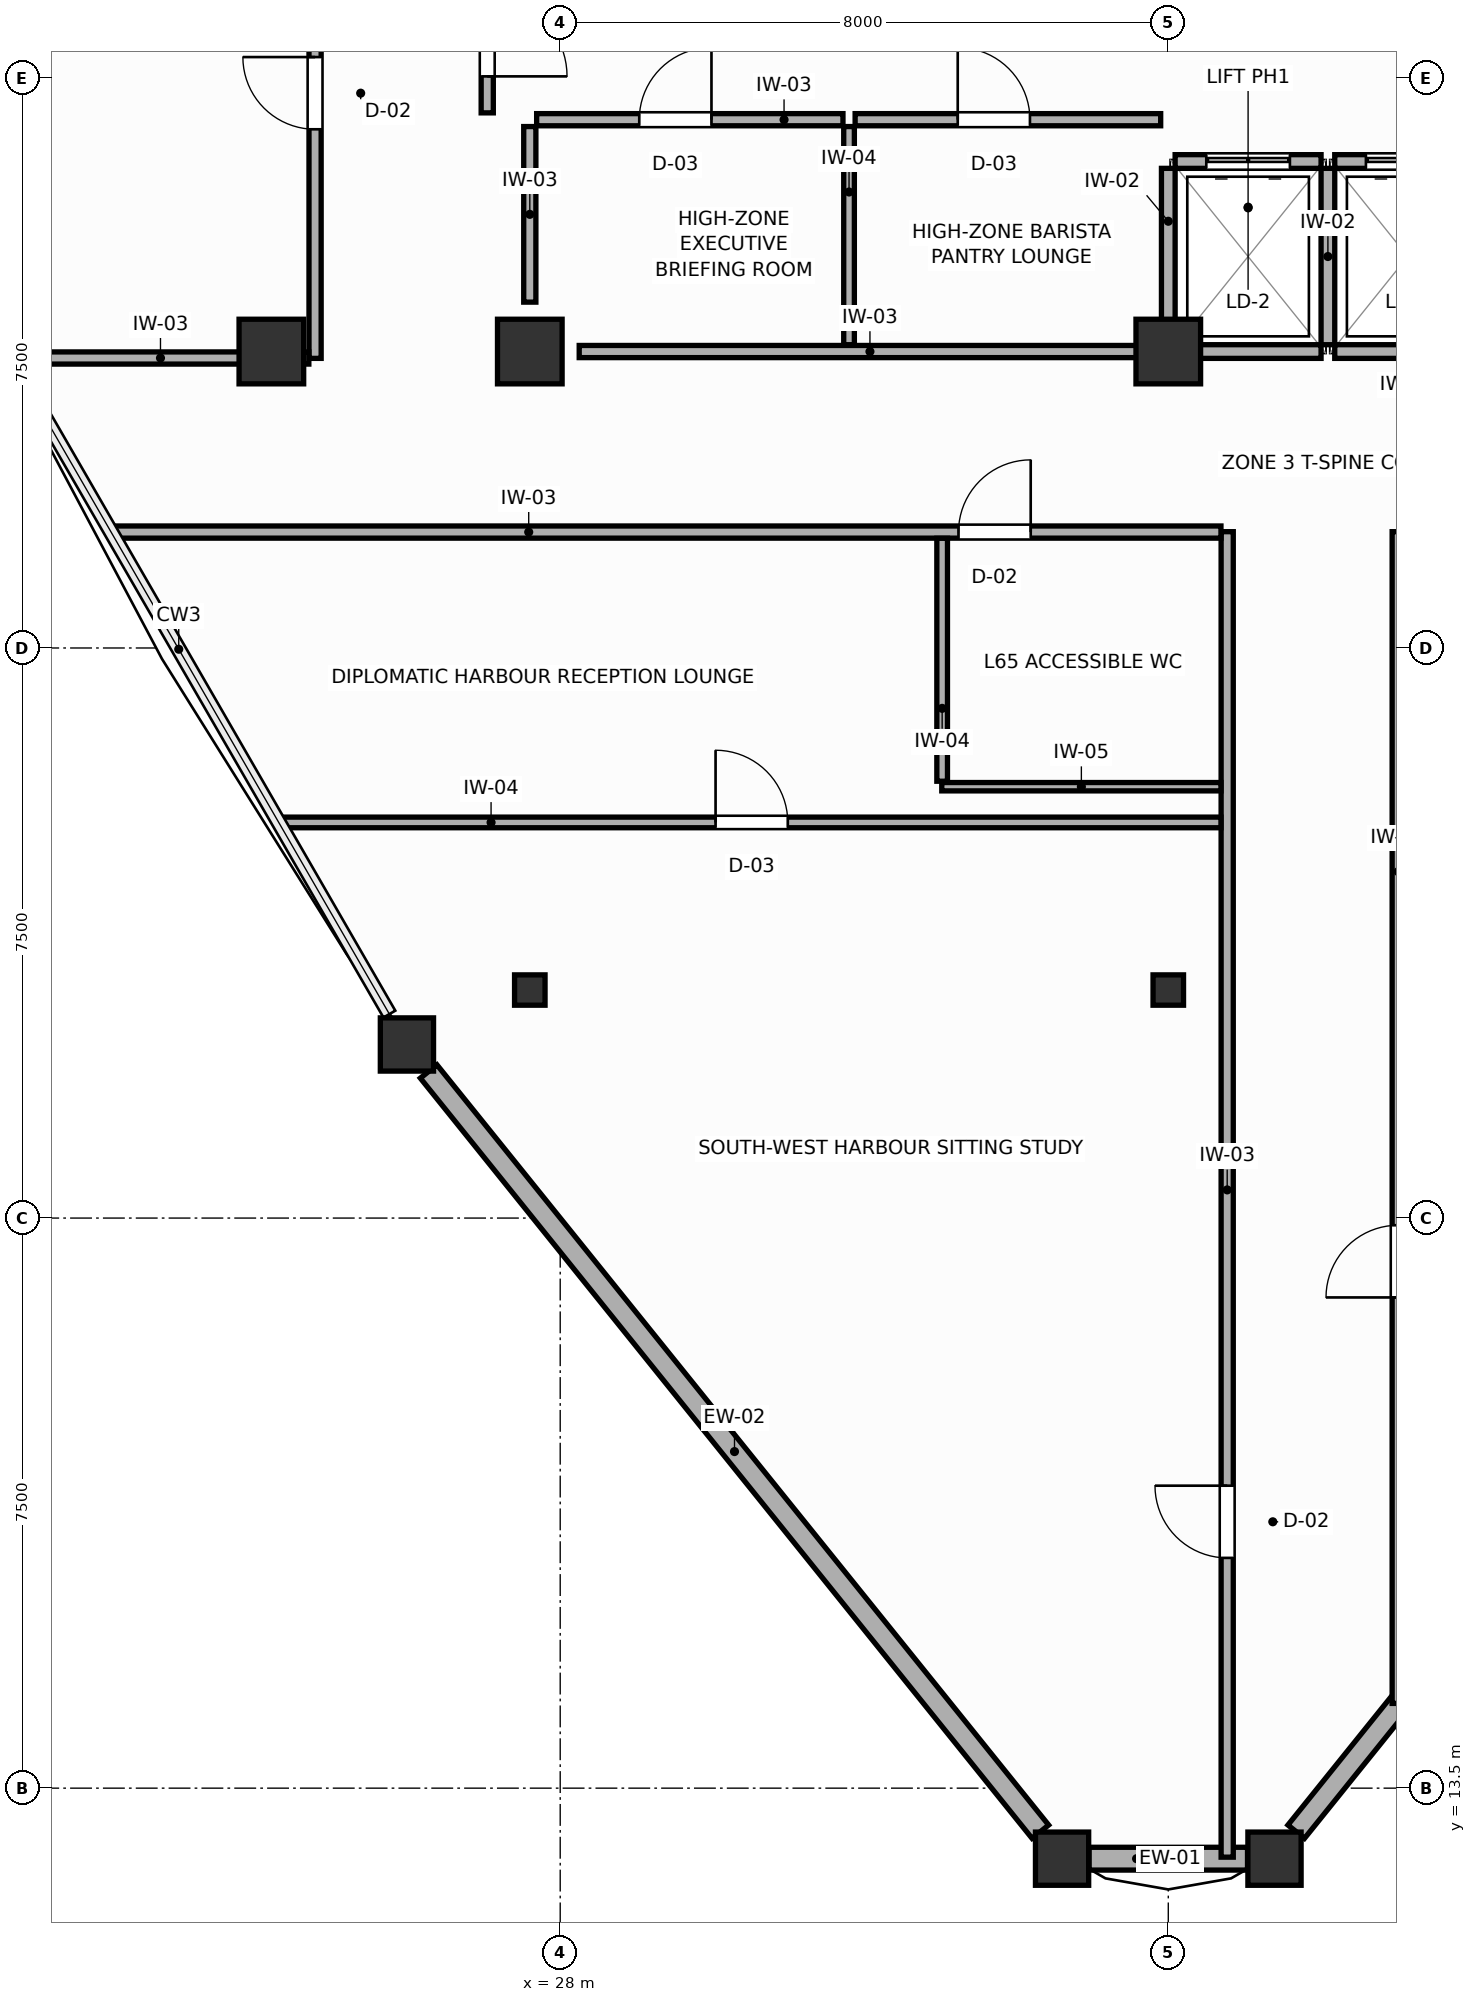
"""IFC4 building model, lengths in metres.
Left out: names, types, materials, properties, quantities, classifications, styles, units other than length and angle.
Written with IfcOpenShell. Run it as: python <this file> out.ifc"""

import sys

from ifc_helpers import new_model, si_unit, direction, frame, frame_2d, origin, origin_2d, place, context, subcontext, project, spatial, rectangle, i_section, extrude, source, transform, mapped, element, fill, save


model = new_model("IFC4")
c1 = context("Model", 3, precision=1e-05, world=origin(), true_north=direction((0.0, 1.0)))
c2 = subcontext(c1, "Body", "Model", "MODEL_VIEW")
j1 = project(units=[si_unit("LENGTHUNIT", "METRE"), si_unit("PLANEANGLEUNIT", "RADIAN")], contexts=[c1])
p1 = place(None, origin())
s1 = spatial("IfcSite", under=j1, at=p1, CompositionType="ELEMENT")
p2 = place(p1, origin())
s2 = spatial("IfcBuilding", under=s1, at=p2, CompositionType="ELEMENT")
p3 = place(p2, frame((0.0, 0.0, 250.2)))
s3 = spatial("IfcBuildingStorey", under=s2, at=p3, CompositionType="ELEMENT", Elevation=250.2)
m1 = source(origin(), c2, "Body", "SweptSolid", [
    extrude(rectangle(XDim=0.85, YDim=0.85, at=origin_2d()), origin(), (0.0, 0.0, 1.0), 3.6),
])
for number, where, z_axis, x_axis in (
    (1, (27.6, 32.4, 0.0), (0.0, 0.0, 1.0), (1.0, 0.0, 0.0)),
    (2, (36.0, 32.4, 0.0), (0.0, 0.0, 1.0), (1.0, 0.0, 0.0)),
    (3, (24.2, 32.4, 0.0), (0.0, 0.0, 1.0), (1.0, 0.0, 0.0)),
):
    element("IfcColumn", number, at=place(p3, frame(where, z_axis=z_axis, x_axis=x_axis)), inside=s3, PredefinedType="COLUMN", context=c2, shape_type="MappedRepresentation", body=[
        mapped(m1, transform((0.0, 0.0, 0.0), scale=1.0)),
    ])
m2 = source(origin(), c2, "Body", "SweptSolid", [
    extrude(i_section(OverallWidth=0.401, OverallDepth=0.399, WebThickness=0.022, FlangeThickness=0.036, FilletRadius=0.015, at=origin_2d()), origin(), (0.0, 0.0, 1.0), 3.6),
])
for number, where, z_axis, x_axis in (
    (4, (27.6, 24.0, 0.0), (0.0, 0.0, 1.0), (1.0, 0.0, 0.0)),
    (5, (36.0, 24.0, 0.0), (0.0, 0.0, 1.0), (1.0, 0.0, 0.0)),
):
    element("IfcColumn", number, at=place(p3, frame(where, z_axis=z_axis, x_axis=x_axis)), inside=s3, PredefinedType="COLUMN", context=c2, shape_type="MappedRepresentation", body=[
        mapped(m2, transform((0.0, 0.0, 0.0), scale=1.0)),
    ])
m3 = source(origin(), c2, "Body", "SweptSolid", [
    extrude(rectangle(XDim=0.7, YDim=0.7, at=origin_2d()), origin(), (0.0, 0.0, 1.0), 3.6),
])
for number, where, z_axis, x_axis in (
    (6, (25.983, 23.284, 0.0), (0.0, 0.0, 1.0), (1.0, 0.0, 0.0)),
    (7, (34.603, 12.572, 0.0), (0.0, 0.0, 1.0), (1.0, 0.0, 0.0)),
    (8, (37.397, 12.572, 0.0), (0.0, 0.0, 1.0), (1.0, 0.0, 0.0)),
):
    element("IfcColumn", number, at=place(p3, frame(where, z_axis=z_axis, x_axis=x_axis)), inside=s3, PredefinedType="COLUMN", context=c2, shape_type="MappedRepresentation", body=[
        mapped(m3, transform((0.0, 0.0, 0.0), scale=1.0)),
    ])
p4 = place(p3, frame((26.269, 22.929, 0.0), z_axis=(0.0, 0.0, 1.0), x_axis=(0.626898207352, -0.779101172903, 0.0)))
e9 = element("IfcWall", 9, at=p4, inside=s3, PredefinedType="SOLIDWALL", context=c2, shape_type="SweptSolid", body=[
    extrude(rectangle(XDim=12.837, YDim=0.28, at=frame_2d((6.418, 0.0))), origin(), (0.0, 0.0, 1.0), 1.88),
])
p5 = place(p3, frame((34.958, 12.572, 0.0), z_axis=(0.0, 0.0, 1.0), x_axis=(1.0, 0.0, 0.0)))
e10 = element("IfcWall", 10, at=p5, inside=s3, PredefinedType="SOLIDWALL", context=c2, shape_type="SweptSolid", body=[
    extrude(rectangle(XDim=2.085, YDim=0.3, at=frame_2d((1.042, 0.0))), origin(), (0.0, 0.0, 1.0), 1.88),
])
p6 = place(p3, frame((37.683, 12.927, 0.0), z_axis=(0.0, 0.0, 1.0), x_axis=(0.626898207352, 0.779101172903, 0.0)))
e11 = element("IfcWall", 11, at=p6, inside=s3, PredefinedType="SOLIDWALL", context=c2, shape_type="SweptSolid", body=[
    extrude(rectangle(XDim=12.837, YDim=0.28, at=frame_2d((6.418, 0.0))), origin(), (0.0, 0.0, 1.0), 1.88),
])
p7 = place(p3, frame((36.09, 34.9, 0.0), z_axis=(0.0, 0.0, 1.0), x_axis=(1.0, 0.0, 0.0)))
e12 = element("IfcWall", 12, at=p7, inside=s3, PredefinedType="PARTITIONING", context=c2, shape_type="SweptSolid", body=[
    extrude(rectangle(XDim=1.92, YDim=0.18, at=frame_2d((0.96, 0.0))), origin(), (0.0, 0.0, 1.0), 3.41),
])
p8 = place(p7, frame((0.41, 0.0, 0.0)))
e13 = element("IfcOpeningElement", 13, at=p8, cuts=e12, PredefinedType="OPENING", context=c2, shape_type="SweptSolid", body=[
    extrude(rectangle(XDim=1.1, YDim=2.1, at=frame_2d((0.55, 1.05))), frame((0.0, 0.1, 0.0), z_axis=(0.0, -1.0, 0.0), x_axis=(1.0, 0.0, 0.0)), (0.0, 0.0, 1.0), 0.2),
])
p9 = place(p3, frame((36.09, 32.4, 0.0), z_axis=(0.0, 0.0, 1.0), x_axis=(1.0, 0.0, 0.0)))
e14 = element("IfcWall", 14, at=p9, inside=s3, PredefinedType="PARTITIONING", context=c2, shape_type="SweptSolid", body=[
    extrude(rectangle(XDim=1.92, YDim=0.18, at=frame_2d((0.96, 0.0))), origin(), (0.0, 0.0, 1.0), 2.17),
])
p10 = place(p3, frame((36.0, 32.49, 0.0), z_axis=(0.0, 0.0, 1.0), x_axis=(0.0, 1.0, 0.0)))
e15 = element("IfcWall", 15, at=p10, inside=s3, PredefinedType="PARTITIONING", context=c2, shape_type="SweptSolid", body=[
    extrude(rectangle(XDim=2.32, YDim=0.18, at=frame_2d((1.16, 0.0))), origin(), (0.0, 0.0, 1.0), 3.41),
])
p11 = place(p3, frame((38.19, 34.9, 0.0), z_axis=(0.0, 0.0, 1.0), x_axis=(1.0, 0.0, 0.0)))
e16 = element("IfcWall", 16, at=p11, inside=s3, PredefinedType="PARTITIONING", context=c2, shape_type="SweptSolid", body=[
    extrude(rectangle(XDim=1.92, YDim=0.18, at=frame_2d((0.96, 0.0))), origin(), (0.0, 0.0, 1.0), 3.41),
])
p12 = place(p11, frame((0.41, 0.0, 0.0)))
e17 = element("IfcOpeningElement", 17, at=p12, cuts=e16, PredefinedType="OPENING", context=c2, shape_type="SweptSolid", body=[
    extrude(rectangle(XDim=1.1, YDim=2.1, at=frame_2d((0.55, 1.05))), frame((0.0, 0.1, 0.0), z_axis=(0.0, -1.0, 0.0), x_axis=(1.0, 0.0, 0.0)), (0.0, 0.0, 1.0), 0.2),
])
p13 = place(p3, frame((38.19, 32.4, 0.0), z_axis=(0.0, 0.0, 1.0), x_axis=(1.0, 0.0, 0.0)))
e18 = element("IfcWall", 18, at=p13, inside=s3, PredefinedType="PARTITIONING", context=c2, shape_type="SweptSolid", body=[
    extrude(rectangle(XDim=1.92, YDim=0.18, at=frame_2d((0.96, 0.0))), origin(), (0.0, 0.0, 1.0), 2.17),
])
p14 = place(p3, frame((38.1, 32.49, 0.0), z_axis=(0.0, 0.0, 1.0), x_axis=(0.0, 1.0, 0.0)))
e19 = element("IfcWall", 19, at=p14, inside=s3, PredefinedType="PARTITIONING", context=c2, shape_type="SweptSolid", body=[
    extrude(rectangle(XDim=2.32, YDim=0.18, at=frame_2d((1.16, 0.0))), origin(), (0.0, 0.0, 1.0), 3.41),
])
p15 = place(p3, frame((28.25, 32.4, 0.0), z_axis=(0.0, 0.0, 1.0), x_axis=(1.0, 0.0, 0.0)))
e20 = element("IfcWall", 20, at=p15, inside=s3, PredefinedType="PARTITIONING", context=c2, shape_type="SweptSolid", body=[
    extrude(rectangle(XDim=7.65, YDim=0.16, at=frame_2d((3.825, 0.0))), origin(), (0.0, 0.0, 1.0), 2.17),
])
p16 = place(p3, frame((27.6, 33.05, 0.0), z_axis=(0.0, 0.0, 1.0), x_axis=(0.0, 1.0, 0.0)))
e21 = element("IfcWall", 21, at=p16, inside=s3, PredefinedType="PARTITIONING", context=c2, shape_type="SweptSolid", body=[
    extrude(rectangle(XDim=2.31, YDim=0.16, at=frame_2d((1.155, 0.0))), origin(), (0.0, 0.0, 1.0), 3.41),
])
p17 = place(p3, frame((31.8, 32.49, 0.0), z_axis=(0.0, 0.0, 1.0), x_axis=(0.0, 1.0, 0.0)))
e22 = element("IfcWall", 22, at=p17, inside=s3, PredefinedType="PARTITIONING", context=c2, shape_type="SweptSolid", body=[
    extrude(rectangle(XDim=2.87, YDim=0.14, at=frame_2d((1.435, 0.0))), origin(), (0.0, 0.0, 1.0), 3.41),
])
p18 = place(p3, frame((27.69, 35.45, 0.0), z_axis=(0.0, 0.0, 1.0), x_axis=(1.0, 0.0, 0.0)))
e23 = element("IfcWall", 23, at=p18, inside=s3, PredefinedType="PARTITIONING", context=c2, shape_type="SweptSolid", body=[
    extrude(rectangle(XDim=4.03, YDim=0.16, at=frame_2d((2.015, 0.0))), origin(), (0.0, 0.0, 1.0), 3.41),
])
p19 = place(p18, frame((1.35, 0.0, 0.0)))
e24 = element("IfcOpeningElement", 24, at=p19, cuts=e23, PredefinedType="OPENING", context=c2, shape_type="SweptSolid", body=[
    extrude(rectangle(XDim=0.95, YDim=2.05, at=frame_2d((0.475, 1.025))), frame((0.0, 0.09, 0.0), z_axis=(0.0, -1.0, 0.0), x_axis=(1.0, 0.0, 0.0)), (0.0, 0.0, 1.0), 0.18),
])
p20 = place(p3, frame((31.88, 35.45, 0.0), z_axis=(0.0, 0.0, 1.0), x_axis=(1.0, 0.0, 0.0)))
e25 = element("IfcWall", 25, at=p20, inside=s3, PredefinedType="PARTITIONING", context=c2, shape_type="SweptSolid", body=[
    extrude(rectangle(XDim=4.02, YDim=0.16, at=frame_2d((2.01, 0.0))), origin(), (0.0, 0.0, 1.0), 3.41),
])
p21 = place(p20, frame((1.35, 0.0, 0.0)))
e26 = element("IfcOpeningElement", 26, at=p21, cuts=e25, PredefinedType="OPENING", context=c2, shape_type="SweptSolid", body=[
    extrude(rectangle(XDim=0.95, YDim=2.05, at=frame_2d((0.475, 1.025))), frame((0.0, 0.09, 0.0), z_axis=(0.0, -1.0, 0.0), x_axis=(1.0, 0.0, 0.0)), (0.0, 0.0, 1.0), 0.18),
])
p22 = place(p3, frame((27.04, 35.54, 0.0), z_axis=(0.0, 0.0, 1.0), x_axis=(0.0, 1.0, 0.0)))
e27 = element("IfcWall", 27, at=p22, inside=s3, PredefinedType="PARTITIONING", context=c2, shape_type="SweptSolid", body=[
    extrude(rectangle(XDim=2.11, YDim=0.16, at=frame_2d((1.055, 0.0))), origin(), (0.0, 0.0, 1.0), 3.41),
])
p23 = place(p22, frame((0.48, 0.0, 0.0)))
e28 = element("IfcOpeningElement", 28, at=p23, cuts=e27, PredefinedType="OPENING", context=c2, shape_type="SweptSolid", body=[
    extrude(rectangle(XDim=1.05, YDim=2.1, at=frame_2d((0.525, 1.05))), frame((0.0, 0.09, 0.0), z_axis=(0.0, -1.0, 0.0), x_axis=(1.0, 0.0, 0.0)), (0.0, 0.0, 1.0), 0.18),
])
p24 = place(p3, frame((24.775, 32.31, 0.0), z_axis=(0.0, 0.0, 1.0), x_axis=(0.0, 1.0, 0.0)))
e29 = element("IfcWall", 29, at=p24, inside=s3, PredefinedType="PARTITIONING", context=c2, shape_type="SweptSolid", body=[
    extrude(rectangle(XDim=17.892, YDim=0.16, at=frame_2d((8.946, 0.0))), origin(), (0.0, 0.0, 1.0), 3.41),
])
p25 = place(p24, frame((3.014, 0.0, 0.0)))
e30 = element("IfcOpeningElement", 30, at=p25, cuts=e29, PredefinedType="OPENING", context=c2, shape_type="SweptSolid", body=[
    extrude(rectangle(XDim=0.95, YDim=2.05, at=frame_2d((0.475, 1.025))), frame((0.0, 0.09, 0.0), z_axis=(0.0, -1.0, 0.0), x_axis=(1.0, 0.0, 0.0)), (0.0, 0.0, 1.0), 0.18),
])
p26 = place(p24, frame((11.524, 0.0, 0.0)))
e31 = element("IfcOpeningElement", 31, at=p26, cuts=e29, PredefinedType="OPENING", context=c2, shape_type="SweptSolid", body=[
    extrude(rectangle(XDim=0.95, YDim=2.05, at=frame_2d((0.475, 1.025))), frame((0.0, 0.09, 0.0), z_axis=(0.0, -1.0, 0.0), x_axis=(1.0, 0.0, 0.0)), (0.0, 0.0, 1.0), 0.18),
])
p27 = place(p3, frame((36.775, 12.592, 0.0), z_axis=(0.0, 0.0, 1.0), x_axis=(0.0, 1.0, 0.0)))
e32 = element("IfcWall", 32, at=p27, inside=s3, PredefinedType="PARTITIONING", context=c2, shape_type="SweptSolid", body=[
    extrude(rectangle(XDim=17.438, YDim=0.16, at=frame_2d((8.719, 0.0))), origin(), (0.0, 0.0, 1.0), 3.41),
])
p28 = place(p27, frame((3.937, 0.0, 0.0)))
e33 = element("IfcOpeningElement", 33, at=p28, cuts=e32, PredefinedType="OPENING", context=c2, shape_type="SweptSolid", body=[
    extrude(rectangle(XDim=0.95, YDim=2.05, at=frame_2d((0.475, 1.025))), frame((0.0, 0.09, 0.0), z_axis=(0.0, -1.0, 0.0), x_axis=(1.0, 0.0, 0.0)), (0.0, 0.0, 1.0), 0.18),
])
p29 = place(p3, frame((39.025, 14.615, 0.0), z_axis=(0.0, 0.0, 1.0), x_axis=(0.0, 1.0, 0.0)))
e34 = element("IfcWall", 34, at=p29, inside=s3, PredefinedType="PARTITIONING", context=c2, shape_type="SweptSolid", body=[
    extrude(rectangle(XDim=15.415, YDim=0.16, at=frame_2d((7.708, 0.0))), origin(), (0.0, 0.0, 1.0), 3.41),
])
p30 = place(p29, frame((5.341, 0.0, 0.0)))
e35 = element("IfcOpeningElement", 35, at=p30, cuts=e34, PredefinedType="OPENING", context=c2, shape_type="SweptSolid", body=[
    extrude(rectangle(XDim=0.95, YDim=2.05, at=frame_2d((0.475, 1.025))), frame((0.0, 0.09, 0.0), z_axis=(0.0, -1.0, 0.0), x_axis=(1.0, 0.0, 0.0)), (0.0, 0.0, 1.0), 0.18),
])
p31 = place(p3, frame((22.111, 30.025, 0.0), z_axis=(0.0, 0.0, 1.0), x_axis=(1.0, 0.0, 0.0)))
e36 = element("IfcWall", 36, at=p31, inside=s3, PredefinedType="PARTITIONING", context=c2, shape_type="SweptSolid", body=[
    extrude(rectangle(XDim=14.582, YDim=0.16, at=frame_2d((7.291, 0.0))), origin(), (0.0, 0.0, 1.0), 3.41),
])
p32 = place(p31, frame((11.129, 0.0, 0.0)))
e37 = element("IfcOpeningElement", 37, at=p32, cuts=e36, PredefinedType="OPENING", context=c2, shape_type="SweptSolid", body=[
    extrude(rectangle(XDim=0.95, YDim=2.05, at=frame_2d((0.475, 1.025))), frame((0.0, 0.09, 0.0), z_axis=(0.0, -1.0, 0.0), x_axis=(1.0, 0.0, 0.0)), (0.0, 0.0, 1.0), 0.18),
])
p33 = place(p3, frame((20.789, 32.315, 0.0), z_axis=(0.0, 0.0, 1.0), x_axis=(1.0, 0.0, 0.0)))
e38 = element("IfcWall", 38, at=p33, inside=s3, PredefinedType="PARTITIONING", context=c2, shape_type="SweptSolid", body=[
    extrude(rectangle(XDim=3.904, YDim=0.16, at=frame_2d((1.952, 0.0))), origin(), (0.0, 0.0, 1.0), 2.17),
])
p34 = place(p3, frame((24.317, 26.205, 0.0), z_axis=(0.0, 0.0, 1.0), x_axis=(1.0, 0.0, 0.0)))
e39 = element("IfcWall", 39, at=p34, inside=s3, PredefinedType="PARTITIONING", context=c2, shape_type="SweptSolid", body=[
    extrude(rectangle(XDim=12.376, YDim=0.14, at=frame_2d((6.188, 0.0))), origin(), (0.0, 0.0, 1.0), 3.41),
])
p35 = place(p34, frame((5.727, 0.0, 0.0)))
e40 = element("IfcOpeningElement", 40, at=p35, cuts=e39, PredefinedType="OPENING", context=c2, shape_type="SweptSolid", body=[
    extrude(rectangle(XDim=0.95, YDim=2.05, at=frame_2d((0.475, 1.025))), frame((0.0, 0.08, 0.0), z_axis=(0.0, -1.0, 0.0), x_axis=(1.0, 0.0, 0.0)), (0.0, 0.0, 1.0), 0.16),
])
p36 = place(p3, frame((33.02, 26.675, 0.0), z_axis=(0.0, 0.0, 1.0), x_axis=(1.0, 0.0, 0.0)))
e41 = element("IfcWall", 41, at=p36, inside=s3, PredefinedType="MOVABLE", context=c2, shape_type="SweptSolid", body=[
    extrude(rectangle(XDim=3.673, YDim=0.11, at=frame_2d((1.836, 0.0))), origin(), (0.0, 0.0, 1.0), 3.41),
])
p37 = place(p3, frame((33.025, 26.747, 0.0), z_axis=(0.0, 0.0, 1.0), x_axis=(0.0, 1.0, 0.0)))
e42 = element("IfcWall", 42, at=p37, inside=s3, PredefinedType="PARTITIONING", context=c2, shape_type="SweptSolid", body=[
    extrude(rectangle(XDim=3.196, YDim=0.14, at=frame_2d((1.598, 0.0))), origin(), (0.0, 0.0, 1.0), 3.41),
])
p38 = place(p8, origin())
e43 = element("IfcDoor", 43, at=p38, inside=s3, OperationType="DOUBLE_DOOR_SLIDING", PredefinedType="DOOR", context=c2, shape_type="SweptSolid", body=[
    extrude(rectangle(XDim=1.1, YDim=2.1, at=frame_2d((0.55, 1.05))), frame((0.0, 0.025, 0.0), z_axis=(0.0, -1.0, 0.0), x_axis=(1.0, 0.0, 0.0)), (0.0, 0.0, 1.0), 0.05),
])
fill(e13, e43)
p39 = place(p12, origin())
e44 = element("IfcDoor", 44, at=p39, inside=s3, OperationType="DOUBLE_DOOR_SLIDING", PredefinedType="DOOR", context=c2, shape_type="SweptSolid", body=[
    extrude(rectangle(XDim=1.1, YDim=2.1, at=frame_2d((0.55, 1.05))), frame((0.0, 0.025, 0.0), z_axis=(0.0, -1.0, 0.0), x_axis=(1.0, 0.0, 0.0)), (0.0, 0.0, 1.0), 0.05),
])
fill(e17, e44)
p40 = place(p19, origin())
e45 = element("IfcDoor", 45, at=p40, inside=s3, OperationType="SINGLE_SWING_RIGHT", PredefinedType="DOOR", context=c2, shape_type="SweptSolid", body=[
    extrude(rectangle(XDim=0.95, YDim=2.05, at=frame_2d((0.475, 1.025))), frame((0.0, 0.025, 0.0), z_axis=(0.0, -1.0, 0.0), x_axis=(1.0, 0.0, 0.0)), (0.0, 0.0, 1.0), 0.05),
])
fill(e24, e45)
p41 = place(p21, origin())
e46 = element("IfcDoor", 46, at=p41, inside=s3, OperationType="SINGLE_SWING_LEFT", PredefinedType="DOOR", context=c2, shape_type="SweptSolid", body=[
    extrude(rectangle(XDim=0.95, YDim=2.05, at=frame_2d((0.475, 1.025))), frame((0.0, 0.025, 0.0), z_axis=(0.0, -1.0, 0.0), x_axis=(1.0, 0.0, 0.0)), (0.0, 0.0, 1.0), 0.05),
])
fill(e26, e46)
p42 = place(p23, frame((1.05, 0.0, 0.0), z_axis=(0.0, 0.0, 1.0), x_axis=(-1.0, 0.0, 0.0)))
e47 = element("IfcDoor", 47, at=p42, inside=s3, OperationType="SINGLE_SWING_RIGHT", PredefinedType="DOOR", context=c2, shape_type="SweptSolid", body=[
    extrude(rectangle(XDim=1.05, YDim=2.1, at=frame_2d((0.525, 1.05))), frame((0.0, 0.025, 0.0), z_axis=(0.0, -1.0, 0.0), x_axis=(1.0, 0.0, 0.0)), (0.0, 0.0, 1.0), 0.05),
])
fill(e28, e47)
p43 = place(p25, origin())
e48 = element("IfcDoor", 48, at=p43, inside=s3, OperationType="SINGLE_SWING_RIGHT", PredefinedType="DOOR", context=c2, shape_type="SweptSolid", body=[
    extrude(rectangle(XDim=0.95, YDim=2.05, at=frame_2d((0.475, 1.025))), frame((0.0, 0.025, 0.0), z_axis=(0.0, -1.0, 0.0), x_axis=(1.0, 0.0, 0.0)), (0.0, 0.0, 1.0), 0.05),
])
fill(e30, e48)
p44 = place(p28, origin())
e49 = element("IfcDoor", 49, at=p44, inside=s3, OperationType="SINGLE_SWING_RIGHT", PredefinedType="DOOR", context=c2, shape_type="SweptSolid", body=[
    extrude(rectangle(XDim=0.95, YDim=2.05, at=frame_2d((0.475, 1.025))), frame((0.0, 0.025, 0.0), z_axis=(0.0, -1.0, 0.0), x_axis=(1.0, 0.0, 0.0)), (0.0, 0.0, 1.0), 0.05),
])
fill(e33, e49)
p45 = place(p30, origin())
e50 = element("IfcDoor", 50, at=p45, inside=s3, OperationType="SINGLE_SWING_LEFT", PredefinedType="DOOR", context=c2, shape_type="SweptSolid", body=[
    extrude(rectangle(XDim=0.95, YDim=2.05, at=frame_2d((0.475, 1.025))), frame((0.0, 0.025, 0.0), z_axis=(0.0, -1.0, 0.0), x_axis=(1.0, 0.0, 0.0)), (0.0, 0.0, 1.0), 0.05),
])
fill(e35, e50)
p46 = place(p32, origin())
e51 = element("IfcDoor", 51, at=p46, inside=s3, OperationType="SINGLE_SWING_RIGHT", PredefinedType="DOOR", context=c2, shape_type="SweptSolid", body=[
    extrude(rectangle(XDim=0.95, YDim=2.05, at=frame_2d((0.475, 1.025))), frame((0.0, 0.025, 0.0), z_axis=(0.0, -1.0, 0.0), x_axis=(1.0, 0.0, 0.0)), (0.0, 0.0, 1.0), 0.05),
])
fill(e37, e51)
p47 = place(p35, origin())
e52 = element("IfcDoor", 52, at=p47, inside=s3, OperationType="SINGLE_SWING_LEFT", PredefinedType="DOOR", context=c2, shape_type="SweptSolid", body=[
    extrude(rectangle(XDim=0.95, YDim=2.05, at=frame_2d((0.475, 1.025))), frame((0.0, 0.025, 0.0), z_axis=(0.0, -1.0, 0.0), x_axis=(1.0, 0.0, 0.0)), (0.0, 0.0, 1.0), 0.05),
])
fill(e40, e52)
save(model, sys.argv[1])
